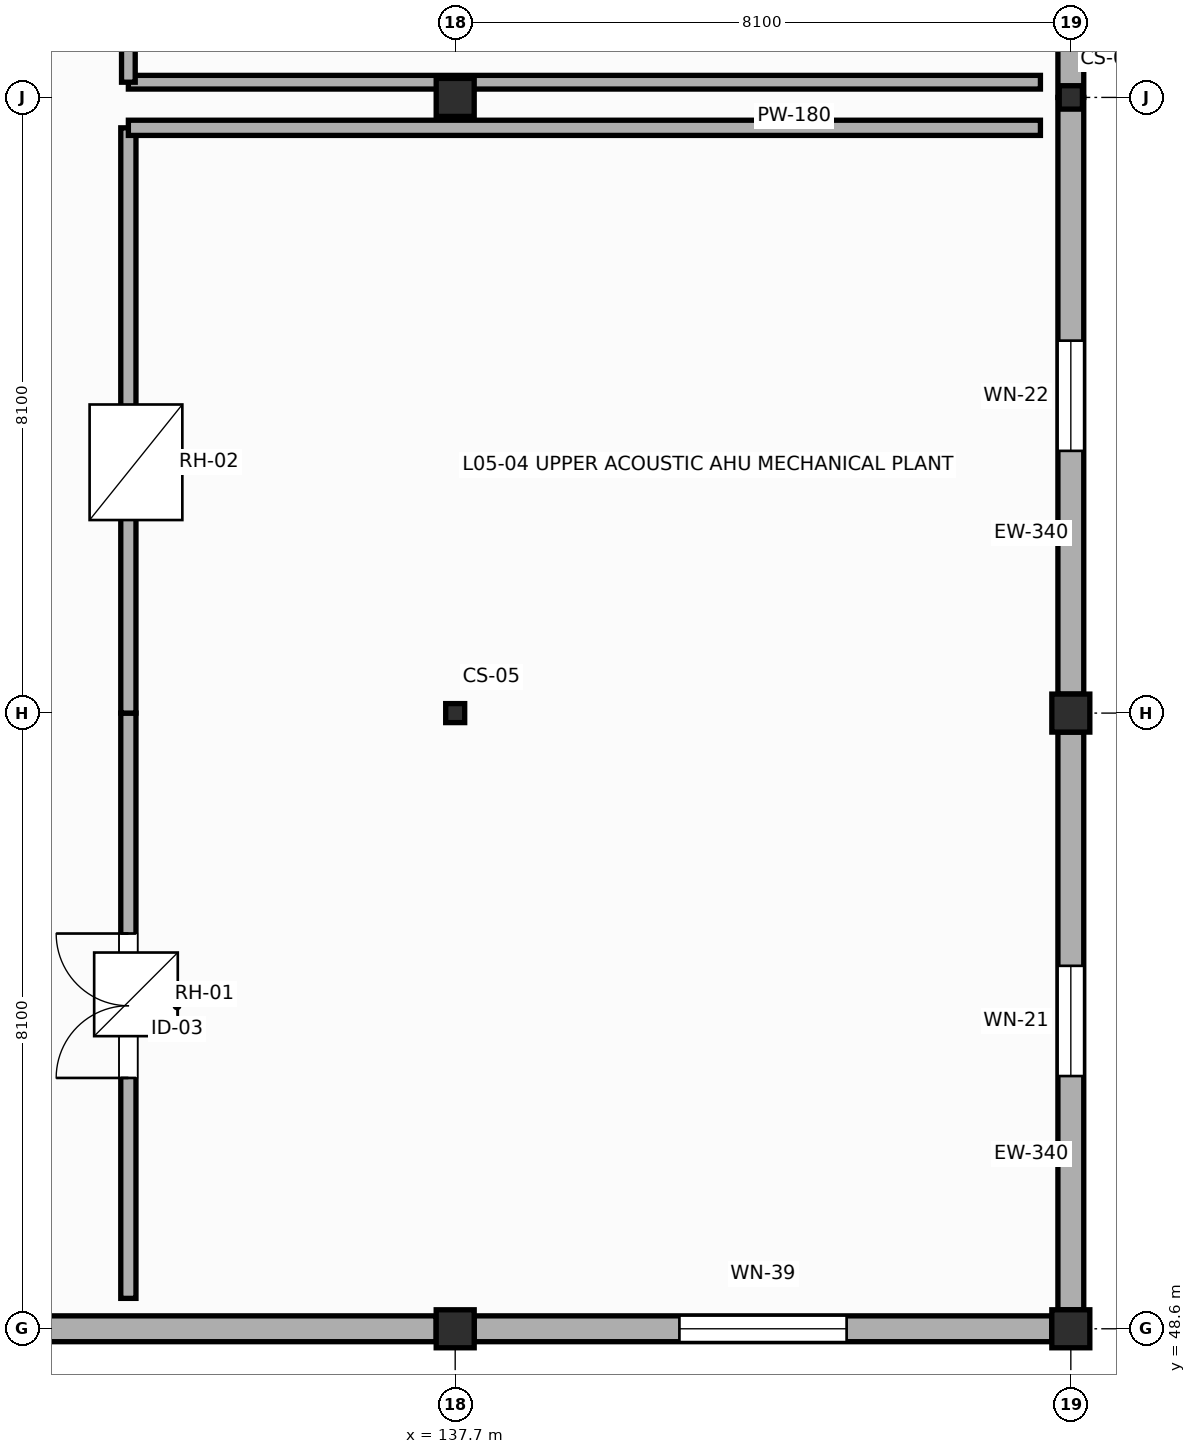
"""IFC4 building model, lengths in metres.
Left out: names, types, materials, properties, quantities, classifications, styles, units other than length and angle.
Written with IfcOpenShell. Run it as: python <this file> out.ifc"""

import sys

from ifc_helpers import new_model, si_unit, direction, frame, frame_2d, origin, origin_2d, place, context, subcontext, project, spatial, rectangle, hollow_rectangle, i_section, extrude, element, fill, save


model = new_model("IFC4")
c1 = context("Model", 3, precision=1e-05, world=origin(), true_north=direction((0.0, 1.0)))
c2 = subcontext(c1, "Body", "Model", "MODEL_VIEW")
j1 = project(units=[si_unit("LENGTHUNIT", "METRE"), si_unit("PLANEANGLEUNIT", "RADIAN")], contexts=[c1])
p1 = place(None, origin())
s1 = spatial("IfcSite", under=j1, at=p1, CompositionType="ELEMENT")
p2 = place(p1, origin())
s2 = spatial("IfcBuilding", under=s1, at=p2, CompositionType="ELEMENT")
p3 = place(p2, frame((0.0, 0.0, 23.4)))
s3 = spatial("IfcBuildingStorey", under=s2, at=p3, CompositionType="ELEMENT", Elevation=23.4)
p4 = place(p3, frame((137.7, 48.6, 0.0), z_axis=(0.0, 0.0, 1.0), x_axis=(1.0, 0.0, 0.0)))
e1 = element("IfcColumn", 1, at=p4, inside=s3, PredefinedType="COLUMN", context=c2, shape_type="SweptSolid", body=[
    extrude(rectangle(XDim=0.5, YDim=0.5, at=origin_2d()), origin(), (0.0, 0.0, 1.0), 4.2),
])
p5 = place(p3, frame((137.7, 56.7, 0.0), z_axis=(0.0, 0.0, 1.0), x_axis=(1.0, 0.0, 0.0)))
e2 = element("IfcColumn", 2, at=p5, inside=s3, PredefinedType="COLUMN", context=c2, shape_type="SweptSolid", body=[
    extrude(hollow_rectangle(XDim=0.25, YDim=0.25, WallThickness=0.012, InnerFilletRadius=0.012, OuterFilletRadius=0.025, at=origin_2d()), origin(), (0.0, 0.0, 1.0), 4.2),
])
for number, where, z_axis, x_axis in (
    (3, (137.7, 64.8, 0.0), (0.0, 0.0, 1.0), (1.0, 0.0, 0.0)),
    (4, (145.8, 48.6, 0.0), (0.0, 0.0, 1.0), (1.0, 0.0, 0.0)),
    (5, (145.8, 56.7, 0.0), (0.0, 0.0, 1.0), (1.0, 0.0, 0.0)),
):
    element("IfcColumn", number, at=place(p3, frame(where, z_axis=z_axis, x_axis=x_axis)), inside=s3, PredefinedType="COLUMN", context=c2, shape_type="SweptSolid", body=[
        extrude(rectangle(XDim=0.5, YDim=0.5, at=origin_2d()), origin(), (0.0, 0.0, 1.0), 4.2),
    ])
p6 = place(p3, frame((145.8, 64.8, 0.0), z_axis=(0.0, 0.0, 1.0), x_axis=(1.0, 0.0, 0.0)))
e6 = element("IfcColumn", 6, at=p6, inside=s3, PredefinedType="COLUMN", context=c2, shape_type="SweptSolid", body=[
    extrude(i_section(OverallWidth=0.305, OverallDepth=0.308, WebThickness=0.01, FlangeThickness=0.015, FilletRadius=0.015, at=origin_2d()), origin(), (0.0, 0.0, 1.0), 4.2),
])
p7 = place(p3, frame((145.8, 48.85, 0.0), z_axis=(0.0, 0.0, 1.0), x_axis=(0.0, 1.0, 0.0)))
e7 = element("IfcWall", 7, at=p7, inside=s3, PredefinedType="SOLIDWALL", context=c2, shape_type="SweptSolid", body=[
    extrude(rectangle(XDim=7.6, YDim=0.34, at=frame_2d((3.8, 0.0))), origin(), (0.0, 0.0, 1.0), 3.607),
])
p8 = place(p7, frame((3.075, 0.0, 0.9)))
e8 = element("IfcOpeningElement", 8, at=p8, cuts=e7, PredefinedType="OPENING", context=c2, shape_type="SweptSolid", body=[
    extrude(rectangle(XDim=1.45, YDim=1.6, at=frame_2d((0.725, 0.8))), frame((0.0, 0.18, 0.0), z_axis=(0.0, -1.0, 0.0), x_axis=(1.0, 0.0, 0.0)), (0.0, 0.0, 1.0), 0.36),
])
p9 = place(p3, frame((145.8, 56.95, 0.0), z_axis=(0.0, 0.0, 1.0), x_axis=(0.0, 1.0, 0.0)))
e9 = element("IfcWall", 9, at=p9, inside=s3, PredefinedType="SOLIDWALL", context=c2, shape_type="SweptSolid", body=[
    extrude(rectangle(XDim=7.85, YDim=0.34, at=frame_2d((3.925, 0.0))), origin(), (0.0, 0.0, 1.0), 3.607),
])
p10 = place(p9, frame((3.2, 0.0, 0.9)))
e10 = element("IfcOpeningElement", 10, at=p10, cuts=e9, PredefinedType="OPENING", context=c2, shape_type="SweptSolid", body=[
    extrude(rectangle(XDim=1.45, YDim=1.9, at=frame_2d((0.725, 0.95))), frame((0.0, 0.18, 0.0), z_axis=(0.0, -1.0, 0.0), x_axis=(1.0, 0.0, 0.0)), (0.0, 0.0, 1.0), 0.36),
])
p11 = place(p3, frame((145.8, 64.8, 0.0), z_axis=(0.0, 0.0, 1.0), x_axis=(0.0, 1.0, 0.0)))
e11 = element("IfcWall", 11, at=p11, inside=s3, PredefinedType="SOLIDWALL", context=c2, shape_type="SweptSolid", body=[
    extrude(rectangle(XDim=8.1, YDim=0.34, at=frame_2d((4.05, 0.0))), origin(), (0.0, 0.0, 1.0), 3.607),
])
p12 = place(p11, frame((3.325, 0.0, 0.9)))
e12 = element("IfcOpeningElement", 12, at=p12, cuts=e11, PredefinedType="OPENING", context=c2, shape_type="SweptSolid", body=[
    extrude(rectangle(XDim=1.45, YDim=2.25, at=frame_2d((0.725, 1.125))), frame((0.0, 0.18, 0.0), z_axis=(0.0, -1.0, 0.0), x_axis=(1.0, 0.0, 0.0)), (0.0, 0.0, 1.0), 0.36),
])
p13 = place(p3, frame((129.85, 48.6, 0.0), z_axis=(0.0, 0.0, 1.0), x_axis=(1.0, 0.0, 0.0)))
e13 = element("IfcWall", 13, at=p13, inside=s3, PredefinedType="SOLIDWALL", context=c2, shape_type="SweptSolid", body=[
    extrude(rectangle(XDim=7.6, YDim=0.34, at=frame_2d((3.8, 0.0))), origin(), (0.0, 0.0, 1.0), 3.495),
])
p14 = place(p3, frame((137.95, 48.6, 0.0), z_axis=(0.0, 0.0, 1.0), x_axis=(1.0, 0.0, 0.0)))
e14 = element("IfcWall", 14, at=p14, inside=s3, PredefinedType="SOLIDWALL", context=c2, shape_type="SweptSolid", body=[
    extrude(rectangle(XDim=7.6, YDim=0.34, at=frame_2d((3.8, 0.0))), origin(), (0.0, 0.0, 1.0), 3.547),
])
p15 = place(p14, frame((2.7, 0.0, 0.9)))
e15 = element("IfcOpeningElement", 15, at=p15, cuts=e14, PredefinedType="OPENING", context=c2, shape_type="SweptSolid", body=[
    extrude(rectangle(XDim=2.2, YDim=1.5, at=frame_2d((1.1, 0.75))), frame((0.0, 0.18, 0.0), z_axis=(0.0, -1.0, 0.0), x_axis=(1.0, 0.0, 0.0)), (0.0, 0.0, 1.0), 0.36),
])
p16 = place(p3, frame((133.4, 49.0, 0.0), z_axis=(0.0, 0.0, 1.0), x_axis=(0.0, 1.0, 0.0)))
e16 = element("IfcWall", 16, at=p16, inside=s3, PredefinedType="PARTITIONING", context=c2, shape_type="SweptSolid", body=[
    extrude(rectangle(XDim=7.7, YDim=0.2, at=frame_2d((3.85, 0.0))), origin(), (0.0, 0.0, 1.0), 3.92),
])
p17 = place(p16, frame((2.9, 0.0, 0.0)))
e17 = element("IfcOpeningElement", 17, at=p17, cuts=e16, PredefinedType="OPENING", context=c2, shape_type="SweptSolid", body=[
    extrude(rectangle(XDim=1.9, YDim=2.4, at=frame_2d((0.95, 1.2))), frame((0.0, 0.11, 0.0), z_axis=(0.0, -1.0, 0.0), x_axis=(1.0, 0.0, 0.0)), (0.0, 0.0, 1.0), 0.22),
])
p18 = place(p3, frame((133.4, 56.7, 0.0), z_axis=(0.0, 0.0, 1.0), x_axis=(0.0, 1.0, 0.0)))
e18 = element("IfcWall", 18, at=p18, inside=s3, PredefinedType="PARTITIONING", context=c2, shape_type="SweptSolid", body=[
    extrude(rectangle(XDim=7.7, YDim=0.2, at=frame_2d((3.85, 0.0))), origin(), (0.0, 0.0, 1.0), 3.92),
])
p19 = place(p3, frame((133.4, 64.4, 0.0), z_axis=(0.0, 0.0, 1.0), x_axis=(1.0, 0.0, 0.0)))
e19 = element("IfcWall", 19, at=p19, inside=s3, PredefinedType="PARTITIONING", context=c2, shape_type="SweptSolid", body=[
    extrude(rectangle(XDim=12.0, YDim=0.2, at=frame_2d((6.0, 0.0))), origin(), (0.0, 0.0, 1.0), 3.064),
])
p20 = place(p3, frame((145.4, 65.0, 0.0), z_axis=(0.0, 0.0, 1.0), x_axis=(-1.0, 0.0, 0.0)))
e20 = element("IfcWall", 20, at=p20, inside=s3, PredefinedType="PARTITIONING", context=c2, shape_type="SweptSolid", body=[
    extrude(rectangle(XDim=12.0, YDim=0.18, at=frame_2d((6.0, 0.0))), origin(), (0.0, 0.0, 1.0), 3.064),
])
p21 = place(p3, frame((133.4, 65.0, 0.0), z_axis=(0.0, 0.0, 1.0), x_axis=(0.0, 1.0, 0.0)))
e21 = element("IfcWall", 21, at=p21, inside=s3, PredefinedType="PARTITIONING", context=c2, shape_type="SweptSolid", body=[
    extrude(rectangle(XDim=7.75, YDim=0.18, at=frame_2d((3.875, 0.0))), origin(), (0.0, 0.0, 1.0), 3.92),
])
p22 = place(p21, frame((2.675, 0.0, 0.0)))
e22 = element("IfcOpeningElement", 22, at=p22, cuts=e21, PredefinedType="OPENING", context=c2, shape_type="SweptSolid", body=[
    extrude(rectangle(XDim=2.4, YDim=2.9, at=frame_2d((1.2, 1.45))), frame((0.0, 0.1, 0.0), z_axis=(0.0, -1.0, 0.0), x_axis=(1.0, 0.0, 0.0)), (0.0, 0.0, 1.0), 0.2),
])
p23 = place(p8, origin())
e23 = element("IfcWindow", 23, at=p23, inside=s3, PartitioningType="SINGLE_PANEL", PredefinedType="WINDOW", context=c2, shape_type="SweptSolid", body=[
    extrude(rectangle(XDim=1.45, YDim=1.6, at=frame_2d((0.725, 0.8))), frame((0.0, 0.03, 0.0), z_axis=(0.0, -1.0, 0.0), x_axis=(1.0, 0.0, 0.0)), (0.0, 0.0, 1.0), 0.06),
])
fill(e8, e23)
p24 = place(p10, origin())
e24 = element("IfcWindow", 24, at=p24, inside=s3, PartitioningType="SINGLE_PANEL", PredefinedType="WINDOW", context=c2, shape_type="SweptSolid", body=[
    extrude(rectangle(XDim=1.45, YDim=1.9, at=frame_2d((0.725, 0.95))), frame((0.0, 0.03, 0.0), z_axis=(0.0, -1.0, 0.0), x_axis=(1.0, 0.0, 0.0)), (0.0, 0.0, 1.0), 0.06),
])
fill(e10, e24)
p25 = place(p15, origin())
e25 = element("IfcWindow", 25, at=p25, inside=s3, PartitioningType="SINGLE_PANEL", PredefinedType="WINDOW", context=c2, shape_type="SweptSolid", body=[
    extrude(rectangle(XDim=2.2, YDim=1.5, at=frame_2d((1.1, 0.75))), frame((0.0, 0.03, 0.0), z_axis=(0.0, -1.0, 0.0), x_axis=(1.0, 0.0, 0.0)), (0.0, 0.0, 1.0), 0.06),
])
fill(e15, e25)
p26 = place(p2, frame((0.0, 0.0, 27.6)))
p27 = place(p26, frame((0.0, 0.0, -0.23)))
p28 = place(p27, frame((133.5, 53.0, 0.0)))
p29 = place(p28, frame((0.0, 0.0, 0.18)))
e26 = element("IfcDoor", 26, at=p29, inside=s3, OperationType="SINGLE_SWING_LEFT", PredefinedType="TRAPDOOR", context=c2, shape_type="SweptSolid", body=[
    extrude(rectangle(XDim=1.1, YDim=1.1, at=origin_2d()), origin(), (0.0, 0.0, 1.0), 0.05),
])
p30 = place(p27, frame((133.5, 60.0, 0.0)))
p31 = place(p30, frame((0.0, 0.0, 0.18)))
e27 = element("IfcDoor", 27, at=p31, inside=s3, OperationType="SINGLE_SWING_LEFT", PredefinedType="TRAPDOOR", context=c2, shape_type="SweptSolid", body=[
    extrude(rectangle(XDim=1.22, YDim=1.52, at=origin_2d()), origin(), (0.0, 0.0, 1.0), 0.05),
])
p32 = place(p17, origin())
e28 = element("IfcDoor", 28, at=p32, inside=s3, OperationType="DOUBLE_DOOR_SINGLE_SWING", PredefinedType="DOOR", context=c2, shape_type="SweptSolid", body=[
    extrude(rectangle(XDim=1.9, YDim=2.4, at=frame_2d((0.95, 1.2))), frame((0.0, 0.025, 0.0), z_axis=(0.0, -1.0, 0.0), x_axis=(1.0, 0.0, 0.0)), (0.0, 0.0, 1.0), 0.05),
])
fill(e17, e28)
save(model, sys.argv[1])
